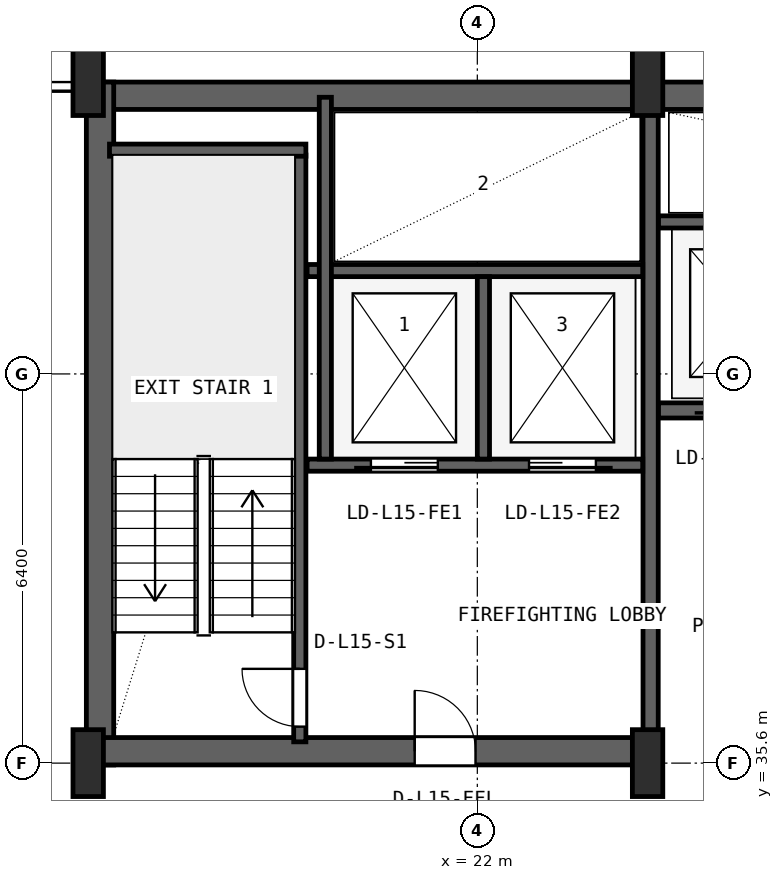
"""IFC4 building model, lengths in metres.
Left out: names, types, materials, properties, quantities, classifications, styles, units other than length and angle.
Written with IfcOpenShell. Run it as: python <this file> out.ifc"""

import sys

from ifc_helpers import new_model, si_unit, direction, frame, frame_2d, origin, origin_2d, place, context, subcontext, project, spatial, rectangle, i_section, extrude, source, transform, mapped, element, fill, save


model = new_model("IFC4")
c1 = context("Model", 3, precision=1e-05, world=origin(), true_north=direction((0.0, 1.0)))
c2 = subcontext(c1, "Body", "Model", "MODEL_VIEW")
j1 = project(units=[si_unit("LENGTHUNIT", "METRE"), si_unit("PLANEANGLEUNIT", "RADIAN")], contexts=[c1])
p1 = place(None, origin())
s1 = spatial("IfcSite", under=j1, at=p1, CompositionType="ELEMENT")
p2 = place(p1, origin())
s2 = spatial("IfcBuilding", under=s1, at=p2, CompositionType="ELEMENT")
p3 = place(p2, frame((0.0, 0.0, 66.6)))
s3 = spatial("IfcBuildingStorey", under=s2, at=p3, CompositionType="ELEMENT", Elevation=66.6)
p4 = place(p3, frame((15.6, 46.575, 0.0), z_axis=(0.0, 0.0, 1.0), x_axis=(1.0, 0.0, 0.0)))
e1 = element("IfcWall", 1, at=p4, inside=s3, PredefinedType="SHEAR", context=c2, shape_type="SweptSolid", body=[
    extrude(rectangle(XDim=36.8, YDim=0.45, at=frame_2d((18.4, 0.0))), origin(), (0.0, 0.0, 1.0), 3.65),
])
p5 = place(p3, frame((15.795, 35.57, 0.0), z_axis=(0.0, 0.0, 1.0), x_axis=(0.0, 1.0, 0.0)))
e2 = element("IfcWall", 2, at=p5, inside=s3, PredefinedType="SHEAR", context=c2, shape_type="SweptSolid", body=[
    extrude(rectangle(XDim=11.23, YDim=0.45, at=frame_2d((5.615, 0.0))), origin(), (0.0, 0.0, 1.0), 3.65),
])
p6 = place(p3, frame((15.57, 35.795, 0.0), z_axis=(0.0, 0.0, 1.0), x_axis=(1.0, 0.0, 0.0)))
e3 = element("IfcWall", 3, at=p6, inside=s3, PredefinedType="SHEAR", context=c2, shape_type="SweptSolid", body=[
    extrude(rectangle(XDim=9.23, YDim=0.45, at=frame_2d((4.615, 0.0))), origin(), (0.0, 0.0, 1.0), 3.65),
])
p7 = place(p6, frame((5.4, 0.0, 0.0)))
e4 = element("IfcOpeningElement", 4, at=p7, cuts=e3, PredefinedType="OPENING", context=c2, shape_type="SweptSolid", body=[
    extrude(rectangle(XDim=1.0, YDim=2.1, at=frame_2d((0.5, 1.05))), frame((0.0, 0.235, 0.0), z_axis=(0.0, -1.0, 0.0), x_axis=(1.0, 0.0, 0.0)), (0.0, 0.0, 1.0), 0.47),
])
m1 = source(origin(), c2, "Body", "SweptSolid", [
    extrude(i_section(OverallWidth=0.5, OverallDepth=1.1, WebThickness=0.018, FlangeThickness=0.032, FilletRadius=0.018, at=origin_2d()), origin(), (0.0, 0.0, 1.0), 3.9),
])
for number, where, z_axis, x_axis in (
    (5, (15.6, 35.6, 0.0), (0.0, 0.0, 1.0), (1.0, 0.0, 0.0)),
    (6, (15.6, 46.8, 0.0), (0.0, 0.0, 1.0), (1.0, 0.0, 0.0)),
    (7, (24.8, 35.6, 0.0), (0.0, 0.0, 1.0), (1.0, 0.0, 0.0)),
    (8, (24.8, 46.8, 0.0), (0.0, 0.0, 1.0), (1.0, 0.0, 0.0)),
):
    element("IfcColumn", number, at=place(p3, frame(where, z_axis=z_axis, x_axis=x_axis)), inside=s3, PredefinedType="COLUMN", context=c2, shape_type="MappedRepresentation", body=[
        mapped(m1, transform((0.0, 0.0, 0.0), x_axis=(1.0, 0.0, 0.0), y_axis=(0.0, 1.0, 0.0), z_axis=(0.0, 0.0, 1.0), scale=1.0)),
    ])
p8 = place(p3, frame((19.08, 35.95, 0.0), z_axis=(0.0, 0.0, 1.0), x_axis=(0.0, 1.0, 0.0)))
e9 = element("IfcWall", 9, at=p8, inside=s3, PredefinedType="SHEAR", context=c2, shape_type="SweptSolid", body=[
    extrude(rectangle(XDim=9.65, YDim=0.2, at=frame_2d((4.825, 0.0))), origin(), (0.0, 0.0, 1.0), 3.65),
])
p9 = place(p8, frame((0.25, 0.0, 0.0)))
e10 = element("IfcOpeningElement", 10, at=p9, cuts=e9, PredefinedType="OPENING", context=c2, shape_type="SweptSolid", body=[
    extrude(rectangle(XDim=0.95, YDim=2.1, at=frame_2d((0.475, 1.05))), frame((0.0, 0.11, 0.0), z_axis=(0.0, -1.0, 0.0), x_axis=(1.0, 0.0, 0.0)), (0.0, 0.0, 1.0), 0.22),
])
p10 = place(p3, frame((15.95, 45.68, 0.0), z_axis=(0.0, 0.0, 1.0), x_axis=(1.0, 0.0, 0.0)))
e11 = element("IfcWall", 11, at=p10, inside=s3, PredefinedType="SHEAR", context=c2, shape_type="SweptSolid", body=[
    extrude(rectangle(XDim=3.23, YDim=0.2, at=frame_2d((1.615, 0.0))), origin(), (0.0, 0.0, 1.0), 3.65),
])
p11 = place(p3, frame((24.85, 36.05, 0.0), z_axis=(0.0, 0.0, 1.0), x_axis=(0.0, 1.0, 0.0)))
e12 = element("IfcWall", 12, at=p11, inside=s3, PredefinedType="SHEAR", context=c2, shape_type="SweptSolid", body=[
    extrude(rectangle(XDim=10.45, YDim=0.25, at=frame_2d((5.225, 0.0))), origin(), (0.0, 0.0, 1.0), 3.65),
])
p12 = place(p3, frame((19.2, 40.5, 0.0), z_axis=(0.0, 0.0, 1.0), x_axis=(1.0, 0.0, 0.0)))
e13 = element("IfcWall", 13, at=p12, inside=s3, PredefinedType="SHEAR", context=c2, shape_type="SweptSolid", body=[
    extrude(rectangle(XDim=5.52, YDim=0.2, at=frame_2d((2.76, 0.0))), origin(), (0.0, 0.0, 1.0), 3.65),
])
p13 = place(p12, frame((1.05, 0.0, 0.0)))
e14 = element("IfcOpeningElement", 14, at=p13, cuts=e13, PredefinedType="OPENING", context=c2, shape_type="SweptSolid", body=[
    extrude(rectangle(XDim=1.1, YDim=2.18, at=frame_2d((0.55, 1.09))), frame((0.0, 0.11, 0.0), z_axis=(0.0, -1.0, 0.0), x_axis=(1.0, 0.0, 0.0)), (0.0, 0.0, 1.0), 0.22),
])
p14 = place(p12, frame((3.65, 0.0, 0.0)))
e15 = element("IfcOpeningElement", 15, at=p14, cuts=e13, PredefinedType="OPENING", context=c2, shape_type="SweptSolid", body=[
    extrude(rectangle(XDim=1.1, YDim=2.18, at=frame_2d((0.55, 1.09))), frame((0.0, 0.11, 0.0), z_axis=(0.0, -1.0, 0.0), x_axis=(1.0, 0.0, 0.0)), (0.0, 0.0, 1.0), 0.22),
])
p15 = place(p3, frame((19.2, 43.7, 0.0), z_axis=(0.0, 0.0, 1.0), x_axis=(1.0, 0.0, 0.0)))
e16 = element("IfcWall", 16, at=p15, inside=s3, PredefinedType="SHEAR", context=c2, shape_type="SweptSolid", body=[
    extrude(rectangle(XDim=5.52, YDim=0.2, at=frame_2d((2.76, 0.0))), origin(), (0.0, 0.0, 1.0), 3.65),
])
p16 = place(p3, frame((22.1, 40.6, 0.0), z_axis=(0.0, 0.0, 1.0), x_axis=(0.0, 1.0, 0.0)))
e17 = element("IfcWall", 17, at=p16, inside=s3, PredefinedType="SHEAR", context=c2, shape_type="SweptSolid", body=[
    extrude(rectangle(XDim=3.0, YDim=0.2, at=frame_2d((1.5, 0.0))), origin(), (0.0, 0.0, 1.0), 3.65),
])
p17 = place(p3, frame((19.5, 40.6, 0.0), z_axis=(0.0, 0.0, 1.0), x_axis=(0.0, 1.0, 0.0)))
e18 = element("IfcWall", 18, at=p17, inside=s3, PredefinedType="SHEAR", context=c2, shape_type="SweptSolid", body=[
    extrude(rectangle(XDim=5.95, YDim=0.2, at=frame_2d((2.975, 0.0))), origin(), (0.0, 0.0, 1.0), 3.65),
])
p18 = place(p3, frame((24.98, 41.4, 0.0), z_axis=(0.0, 0.0, 1.0), x_axis=(1.0, 0.0, 0.0)))
e19 = element("IfcWall", 19, at=p18, inside=s3, PredefinedType="SHEAR", context=c2, shape_type="SweptSolid", body=[
    extrude(rectangle(XDim=23.82, YDim=0.25, at=frame_2d((11.91, 0.0))), origin(), (0.0, 0.0, 1.0), 3.65),
])
p19 = place(p18, frame((0.87, 0.0, 0.0)))
e20 = element("IfcOpeningElement", 20, at=p19, cuts=e19, PredefinedType="OPENING", context=c2, shape_type="SweptSolid", body=[
    extrude(rectangle(XDim=1.1, YDim=2.18, at=frame_2d((0.55, 1.09))), frame((0.0, 0.135, 0.0), z_axis=(0.0, -1.0, 0.0), x_axis=(1.0, 0.0, 0.0)), (0.0, 0.0, 1.0), 0.27),
])
p20 = place(p18, frame((3.47, 0.0, 0.0)))
e21 = element("IfcOpeningElement", 21, at=p20, cuts=e19, PredefinedType="OPENING", context=c2, shape_type="SweptSolid", body=[
    extrude(rectangle(XDim=1.1, YDim=2.18, at=frame_2d((0.55, 1.09))), frame((0.0, 0.135, 0.0), z_axis=(0.0, -1.0, 0.0), x_axis=(1.0, 0.0, 0.0)), (0.0, 0.0, 1.0), 0.27),
])
p21 = place(p18, frame((6.07, 0.0, 0.0)))
e22 = element("IfcOpeningElement", 22, at=p21, cuts=e19, PredefinedType="OPENING", context=c2, shape_type="SweptSolid", body=[
    extrude(rectangle(XDim=1.1, YDim=2.18, at=frame_2d((0.55, 1.09))), frame((0.0, 0.135, 0.0), z_axis=(0.0, -1.0, 0.0), x_axis=(1.0, 0.0, 0.0)), (0.0, 0.0, 1.0), 0.27),
])
p22 = place(p3, frame((24.98, 44.5, 0.0), z_axis=(0.0, 0.0, 1.0), x_axis=(1.0, 0.0, 0.0)))
e23 = element("IfcWall", 23, at=p22, inside=s3, PredefinedType="SHEAR", context=c2, shape_type="SweptSolid", body=[
    extrude(rectangle(XDim=7.87, YDim=0.2, at=frame_2d((3.935, 0.0))), origin(), (0.0, 0.0, 1.0), 3.65),
])
m2 = source(origin(), c2, "Body", "SweptSolid", [
    extrude(rectangle(XDim=0.95, YDim=2.1, at=frame_2d((0.475, 1.05))), frame((0.0, 0.025, 0.0), z_axis=(0.0, -1.0, 0.0), x_axis=(1.0, 0.0, 0.0)), (0.0, 0.0, 1.0), 0.05),
])
p23 = place(p9, origin())
e24 = element("IfcDoor", 24, at=p23, inside=s3, OperationType="SINGLE_SWING_RIGHT", PredefinedType="DOOR", context=c2, shape_type="MappedRepresentation", body=[
    mapped(m2, transform((0.0, 0.0, 0.0), x_axis=(1.0, 0.0, 0.0), y_axis=(0.0, 1.0, 0.0), z_axis=(0.0, 0.0, 1.0), scale=1.0)),
])
fill(e10, e24)
m3 = source(origin(), c2, "Body", "SweptSolid", [
    extrude(rectangle(XDim=1.0, YDim=2.1, at=frame_2d((0.5, 1.05))), frame((0.0, 0.025, 0.0), z_axis=(0.0, -1.0, 0.0), x_axis=(1.0, 0.0, 0.0)), (0.0, 0.0, 1.0), 0.05),
])
p24 = place(p7, origin())
e25 = element("IfcDoor", 25, at=p24, inside=s3, OperationType="SINGLE_SWING_LEFT", PredefinedType="DOOR", context=c2, shape_type="MappedRepresentation", body=[
    mapped(m3, transform((0.0, 0.0, 0.0), x_axis=(1.0, 0.0, 0.0), y_axis=(0.0, 1.0, 0.0), z_axis=(0.0, 0.0, 1.0), scale=1.0)),
])
fill(e4, e25)
m4 = source(origin(), c2, "Body", "SweptSolid", [
    extrude(rectangle(XDim=1.1, YDim=2.18, at=frame_2d((0.55, 1.09))), frame((0.0, 0.025, 0.0), z_axis=(0.0, -1.0, 0.0), x_axis=(1.0, 0.0, 0.0)), (0.0, 0.0, 1.0), 0.05),
])
p25 = place(p13, frame((1.1, 0.0, 0.0), z_axis=(0.0, 0.0, 1.0), x_axis=(-1.0, 0.0, 0.0)))
e26 = element("IfcDoor", 26, at=p25, inside=s3, OperationType="SLIDING_TO_LEFT", PredefinedType="DOOR", context=c2, shape_type="MappedRepresentation", body=[
    mapped(m4, transform((0.0, 0.0, 0.0), x_axis=(1.0, 0.0, 0.0), y_axis=(0.0, 1.0, 0.0), z_axis=(0.0, 0.0, 1.0), scale=1.0)),
])
fill(e14, e26)
p26 = place(p14, frame((1.1, 0.0, 0.0), z_axis=(0.0, 0.0, 1.0), x_axis=(-1.0, 0.0, 0.0)))
e27 = element("IfcDoor", 27, at=p26, inside=s3, OperationType="SLIDING_TO_RIGHT", PredefinedType="DOOR", context=c2, shape_type="MappedRepresentation", body=[
    mapped(m4, transform((0.0, 0.0, 0.0), x_axis=(1.0, 0.0, 0.0), y_axis=(0.0, 1.0, 0.0), z_axis=(0.0, 0.0, 1.0), scale=1.0)),
])
fill(e15, e27)
save(model, sys.argv[1])
